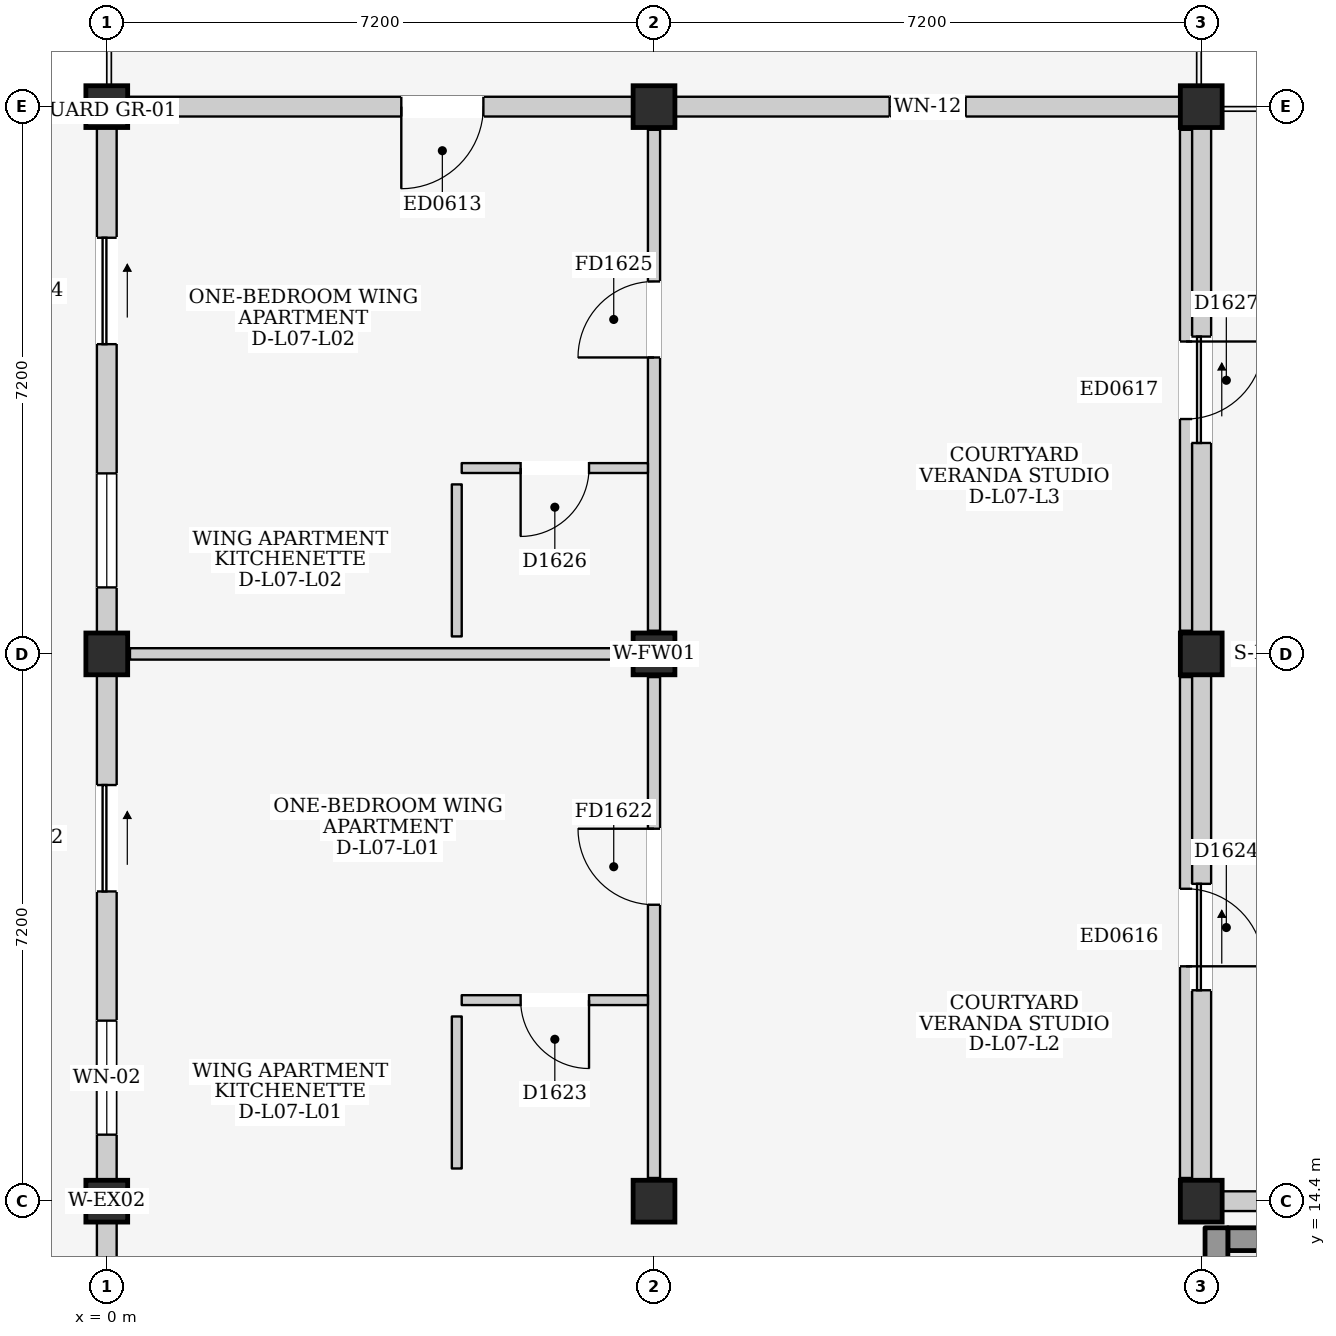
"""IFC4 building model, lengths in metres.
Left out: names, types, materials, properties, quantities, classifications, styles, units other than length and angle.
Written with IfcOpenShell. Run it as: python <this file> out.ifc"""

import sys

from ifc_helpers import new_model, si_unit, direction, frame, frame_2d, origin, origin_2d, place, context, subcontext, project, spatial, rectangle, extrude, element, fill, save


model = new_model("IFC4")
c1 = context("Model", 3, precision=1e-05, world=origin(), true_north=direction((0.0, 1.0)))
c2 = subcontext(c1, "Body", "Model", "MODEL_VIEW")
j1 = project(units=[si_unit("LENGTHUNIT", "METRE"), si_unit("PLANEANGLEUNIT", "RADIAN")], contexts=[c1])
p1 = place(None, origin())
s1 = spatial("IfcSite", under=j1, at=p1, CompositionType="ELEMENT")
p2 = place(p1, origin())
s2 = spatial("IfcBuilding", under=s1, at=p2, CompositionType="ELEMENT")
p3 = place(p2, frame((0.0, 0.0, 25.1)))
s3 = spatial("IfcBuildingStorey", under=s2, at=p3, CompositionType="ELEMENT", Elevation=25.1)
for number, where, z_axis, x_axis in (
    (1, (0.0, 14.4, 0.0), (0.0, 0.0, 1.0), (1.0, 0.0, 0.0)),
    (2, (0.0, 21.6, 0.0), (0.0, 0.0, 1.0), (1.0, 0.0, 0.0)),
    (3, (0.0, 28.8, 0.0), (0.0, 0.0, 1.0), (1.0, 0.0, 0.0)),
    (4, (7.2, 14.4, 0.0), (0.0, 0.0, 1.0), (1.0, 0.0, 0.0)),
    (5, (7.2, 21.6, 0.0), (0.0, 0.0, 1.0), (1.0, 0.0, 0.0)),
    (6, (7.2, 28.8, 0.0), (0.0, 0.0, 1.0), (1.0, 0.0, 0.0)),
    (7, (14.4, 14.4, 0.0), (0.0, 0.0, 1.0), (1.0, 0.0, 0.0)),
    (8, (14.4, 21.6, 0.0), (0.0, 0.0, 1.0), (1.0, 0.0, 0.0)),
    (9, (14.4, 28.8, 0.0), (0.0, 0.0, 1.0), (1.0, 0.0, 0.0)),
):
    element("IfcColumn", number, at=place(p3, frame(where, z_axis=z_axis, x_axis=x_axis)), inside=s3, PredefinedType="COLUMN", context=c2, shape_type="SweptSolid", body=[
        extrude(rectangle(XDim=0.55, YDim=0.55, at=origin_2d()), origin(), (0.0, 0.0, 1.0), 3.2),
    ])
p4 = place(p3, frame((0.0, 7.475, 0.0), z_axis=(0.0, 0.0, 1.0), x_axis=(0.0, 1.0, 0.0)))
e10 = element("IfcWall", 10, at=p4, inside=s3, PredefinedType="ELEMENTEDWALL", context=c2, shape_type="SweptSolid", body=[
    extrude(rectangle(XDim=6.65, YDim=0.26, at=frame_2d((3.325, 0.0))), origin(), (0.0, 0.0, 1.0), 2.525),
])
p5 = place(p4, frame((3.65, 0.0, 0.0)))
e11 = element("IfcOpeningElement", 11, at=p5, cuts=e10, PredefinedType="OPENING", context=c2, shape_type="SweptSolid", body=[
    extrude(rectangle(XDim=1.4, YDim=2.1, at=frame_2d((0.7, 1.05))), frame((0.0, 0.145, 0.0), z_axis=(0.0, -1.0, 0.0), x_axis=(1.0, 0.0, 0.0)), (0.0, 0.0, 1.0), 0.29),
])
p6 = place(p3, frame((0.0, 14.675, 0.0), z_axis=(0.0, 0.0, 1.0), x_axis=(0.0, 1.0, 0.0)))
e12 = element("IfcWall", 12, at=p6, inside=s3, PredefinedType="ELEMENTEDWALL", context=c2, shape_type="SweptSolid", body=[
    extrude(rectangle(XDim=6.65, YDim=0.26, at=frame_2d((3.325, 0.0))), origin(), (0.0, 0.0, 1.0), 2.525),
])
p7 = place(p6, frame((3.8, 0.0, 0.0)))
e13 = element("IfcOpeningElement", 13, at=p7, cuts=e12, PredefinedType="OPENING", context=c2, shape_type="SweptSolid", body=[
    extrude(rectangle(XDim=1.4, YDim=2.1, at=frame_2d((0.7, 1.05))), frame((0.0, 0.145, 0.0), z_axis=(0.0, -1.0, 0.0), x_axis=(1.0, 0.0, 0.0)), (0.0, 0.0, 1.0), 0.29),
])
p8 = place(p6, frame((0.6, 0.0, 0.915)))
e14 = element("IfcOpeningElement", 14, at=p8, cuts=e12, PredefinedType="OPENING", context=c2, shape_type="SweptSolid", body=[
    extrude(rectangle(XDim=1.5, YDim=1.5, at=frame_2d((0.75, 0.75))), frame((0.0, 0.145, 0.0), z_axis=(0.0, -1.0, 0.0), x_axis=(1.0, 0.0, 0.0)), (0.0, 0.0, 1.0), 0.29),
])
p9 = place(p3, frame((0.275, 28.8, 0.0), z_axis=(0.0, 0.0, 1.0), x_axis=(1.0, 0.0, 0.0)))
e15 = element("IfcWall", 15, at=p9, inside=s3, PredefinedType="ELEMENTEDWALL", context=c2, shape_type="SweptSolid", body=[
    extrude(rectangle(XDim=6.65, YDim=0.26, at=frame_2d((3.325, 0.0))), origin(), (0.0, 0.0, 1.0), 2.375),
])
p10 = place(p9, frame((3.6, 0.0, 0.0)))
e16 = element("IfcOpeningElement", 16, at=p10, cuts=e15, PredefinedType="OPENING", context=c2, shape_type="SweptSolid", body=[
    extrude(rectangle(XDim=1.08, YDim=2.12, at=frame_2d((0.54, 1.06))), frame((0.0, 0.145, 0.0), z_axis=(0.0, -1.0, 0.0), x_axis=(1.0, 0.0, 0.0)), (0.0, 0.0, 1.0), 0.29),
])
p11 = place(p3, frame((0.0, 21.875, 0.0), z_axis=(0.0, 0.0, 1.0), x_axis=(0.0, 1.0, 0.0)))
e17 = element("IfcWall", 17, at=p11, inside=s3, PredefinedType="ELEMENTEDWALL", context=c2, shape_type="SweptSolid", body=[
    extrude(rectangle(XDim=6.65, YDim=0.26, at=frame_2d((3.325, 0.0))), origin(), (0.0, 0.0, 1.0), 2.525),
])
p12 = place(p11, frame((3.8, 0.0, 0.0)))
e18 = element("IfcOpeningElement", 18, at=p12, cuts=e17, PredefinedType="OPENING", context=c2, shape_type="SweptSolid", body=[
    extrude(rectangle(XDim=1.4, YDim=2.1, at=frame_2d((0.7, 1.05))), frame((0.0, 0.145, 0.0), z_axis=(0.0, -1.0, 0.0), x_axis=(1.0, 0.0, 0.0)), (0.0, 0.0, 1.0), 0.29),
])
p13 = place(p11, frame((0.6, 0.0, 0.915)))
e19 = element("IfcOpeningElement", 19, at=p13, cuts=e17, PredefinedType="OPENING", context=c2, shape_type="SweptSolid", body=[
    extrude(rectangle(XDim=1.5, YDim=1.5, at=frame_2d((0.75, 0.75))), frame((0.0, 0.145, 0.0), z_axis=(0.0, -1.0, 0.0), x_axis=(1.0, 0.0, 0.0)), (0.0, 0.0, 1.0), 0.29),
])
p14 = place(p3, frame((14.4, 14.675, 0.0), z_axis=(0.0, 0.0, 1.0), x_axis=(0.0, 1.0, 0.0)))
e20 = element("IfcWall", 20, at=p14, inside=s3, PredefinedType="ELEMENTEDWALL", context=c2, shape_type="SweptSolid", body=[
    extrude(rectangle(XDim=6.65, YDim=0.26, at=frame_2d((3.325, 0.0))), origin(), (0.0, 0.0, 1.0), 2.475),
])
p15 = place(p14, frame((2.5, 0.0, 0.0)))
e21 = element("IfcOpeningElement", 21, at=p15, cuts=e20, PredefinedType="OPENING", context=c2, shape_type="SweptSolid", body=[
    extrude(rectangle(XDim=1.4, YDim=2.1, at=frame_2d((0.7, 1.05))), frame((0.0, 0.145, 0.0), z_axis=(0.0, -1.0, 0.0), x_axis=(1.0, 0.0, 0.0)), (0.0, 0.0, 1.0), 0.29),
])
p16 = place(p3, frame((7.475, 28.8, 0.0), z_axis=(0.0, 0.0, 1.0), x_axis=(1.0, 0.0, 0.0)))
e22 = element("IfcWall", 22, at=p16, inside=s3, PredefinedType="ELEMENTEDWALL", context=c2, shape_type="SweptSolid", body=[
    extrude(rectangle(XDim=6.65, YDim=0.26, at=frame_2d((3.325, 0.0))), origin(), (0.0, 0.0, 1.0), 2.375),
])
p17 = place(p16, frame((2.825, 0.0, 1.1)))
e23 = element("IfcOpeningElement", 23, at=p17, cuts=e22, PredefinedType="OPENING", context=c2, shape_type="SweptSolid", body=[
    extrude(rectangle(XDim=1.0, YDim=0.9, at=frame_2d((0.5, 0.45))), frame((0.0, 0.145, 0.0), z_axis=(0.0, -1.0, 0.0), x_axis=(1.0, 0.0, 0.0)), (0.0, 0.0, 1.0), 0.29),
])
p18 = place(p3, frame((14.4, 21.875, 0.0), z_axis=(0.0, 0.0, 1.0), x_axis=(0.0, 1.0, 0.0)))
e24 = element("IfcWall", 24, at=p18, inside=s3, PredefinedType="ELEMENTEDWALL", context=c2, shape_type="SweptSolid", body=[
    extrude(rectangle(XDim=6.65, YDim=0.26, at=frame_2d((3.325, 0.0))), origin(), (0.0, 0.0, 1.0), 2.475),
])
p19 = place(p18, frame((2.5, 0.0, 0.0)))
e25 = element("IfcOpeningElement", 25, at=p19, cuts=e24, PredefinedType="OPENING", context=c2, shape_type="SweptSolid", body=[
    extrude(rectangle(XDim=1.4, YDim=2.1, at=frame_2d((0.7, 1.05))), frame((0.0, 0.145, 0.0), z_axis=(0.0, -1.0, 0.0), x_axis=(1.0, 0.0, 0.0)), (0.0, 0.0, 1.0), 0.29),
])
p20 = place(p3, frame((14.675, 14.4, 0.0), z_axis=(0.0, 0.0, 1.0), x_axis=(1.0, 0.0, 0.0)))
e26 = element("IfcWall", 26, at=p20, inside=s3, PredefinedType="ELEMENTEDWALL", context=c2, shape_type="SweptSolid", body=[
    extrude(rectangle(XDim=6.65, YDim=0.26, at=frame_2d((3.325, 0.0))), origin(), (0.0, 0.0, 1.0), 2.375),
])
p21 = place(p20, frame((2.825, 0.0, 1.2)))
e27 = element("IfcOpeningElement", 27, at=p21, cuts=e26, PredefinedType="OPENING", context=c2, shape_type="SweptSolid", body=[
    extrude(rectangle(XDim=1.0, YDim=0.9, at=frame_2d((0.5, 0.45))), frame((0.0, 0.145, 0.0), z_axis=(0.0, -1.0, 0.0), x_axis=(1.0, 0.0, 0.0)), (0.0, 0.0, 1.0), 0.29),
])
p22 = place(p3, frame((14.75, 13.9, 0.0), z_axis=(0.0, 0.0, 1.0), x_axis=(1.0, 0.0, 0.0)))
e28 = element("IfcWall", 28, at=p22, inside=s3, PredefinedType="SHEAR", context=c2, shape_type="SweptSolid", body=[
    extrude(rectangle(XDim=6.5, YDim=0.3, at=frame_2d((3.25, 0.0))), origin(), (0.0, 0.0, 1.0), 2.99),
])
p23 = place(p3, frame((14.6, 10.45, 0.0), z_axis=(0.0, 0.0, 1.0), x_axis=(0.0, 1.0, 0.0)))
e29 = element("IfcWall", 29, at=p23, inside=s3, PredefinedType="SHEAR", context=c2, shape_type="SweptSolid", body=[
    extrude(rectangle(XDim=3.6, YDim=0.3, at=frame_2d((1.8, 0.0))), origin(), (0.0, 0.0, 1.0), 2.99),
])
p24 = place(p3, frame((7.2, 14.705, 0.0), z_axis=(0.0, 0.0, 1.0), x_axis=(0.0, 1.0, 0.0)))
e30 = element("IfcWall", 30, at=p24, inside=s3, PredefinedType="PARTITIONING", context=c2, shape_type="SweptSolid", body=[
    extrude(rectangle(XDim=6.59, YDim=0.16, at=frame_2d((3.295, 0.0))), origin(), (0.0, 0.0, 1.0), 2.475),
])
p25 = place(p24, frame((3.595, 0.0, 0.0)))
e31 = element("IfcOpeningElement", 31, at=p25, cuts=e30, PredefinedType="OPENING", context=c2, shape_type="SweptSolid", body=[
    extrude(rectangle(XDim=1.0, YDim=2.15, at=frame_2d((0.5, 1.075))), frame((0.0, 0.095, 0.0), z_axis=(0.0, -1.0, 0.0), x_axis=(1.0, 0.0, 0.0)), (0.0, 0.0, 1.0), 0.19),
])
p26 = place(p3, frame((0.305, 21.6, 0.0), z_axis=(0.0, 0.0, 1.0), x_axis=(1.0, 0.0, 0.0)))
e32 = element("IfcWall", 32, at=p26, inside=s3, PredefinedType="PARTITIONING", context=c2, shape_type="SweptSolid", body=[
    extrude(rectangle(XDim=6.59, YDim=0.15, at=frame_2d((3.295, 0.0))), origin(), (0.0, 0.0, 1.0), 2.375),
])
p27 = place(p3, frame((4.67, 17.045, 0.0), z_axis=(0.0, 0.0, 1.0), x_axis=(1.0, 0.0, 0.0)))
e33 = element("IfcWall", 33, at=p27, inside=s3, PredefinedType="PARTITIONING", context=c2, shape_type="SweptSolid", body=[
    extrude(rectangle(XDim=2.45, YDim=0.13, at=frame_2d((1.225, 0.0))), origin(), (0.0, 0.0, 1.0), 2.99),
])
p28 = place(p27, frame((0.775, 0.0, 0.0)))
e34 = element("IfcOpeningElement", 34, at=p28, cuts=e33, PredefinedType="OPENING", context=c2, shape_type="SweptSolid", body=[
    extrude(rectangle(XDim=0.9, YDim=2.1, at=frame_2d((0.45, 1.05))), frame((0.0, 0.08, 0.0), z_axis=(0.0, -1.0, 0.0), x_axis=(1.0, 0.0, 0.0)), (0.0, 0.0, 1.0), 0.16),
])
p29 = place(p3, frame((4.605, 14.83, 0.0), z_axis=(0.0, 0.0, 1.0), x_axis=(0.0, 1.0, 0.0)))
e35 = element("IfcWall", 35, at=p29, inside=s3, PredefinedType="PARTITIONING", context=c2, shape_type="SweptSolid", body=[
    extrude(rectangle(XDim=2.0, YDim=0.13, at=frame_2d((1.0, 0.0))), origin(), (0.0, 0.0, 1.0), 2.99),
])
p30 = place(p3, frame((14.2, 14.705, 0.0), z_axis=(0.0, 0.0, 1.0), x_axis=(0.0, 1.0, 0.0)))
e36 = element("IfcWall", 36, at=p30, inside=s3, PredefinedType="PARTITIONING", context=c2, shape_type="SweptSolid", body=[
    extrude(rectangle(XDim=6.59, YDim=0.16, at=frame_2d((3.295, 0.0))), origin(), (0.0, 0.0, 1.0), 2.99),
])
p31 = place(p30, frame((2.785, 0.0, 0.0)))
e37 = element("IfcOpeningElement", 37, at=p31, cuts=e36, PredefinedType="OPENING", context=c2, shape_type="SweptSolid", body=[
    extrude(rectangle(XDim=1.02, YDim=2.18, at=frame_2d((0.51, 1.09))), frame((0.0, 0.095, 0.0), z_axis=(0.0, -1.0, 0.0), x_axis=(1.0, 0.0, 0.0)), (0.0, 0.0, 1.0), 0.19),
])
p32 = place(p3, frame((7.2, 21.905, 0.0), z_axis=(0.0, 0.0, 1.0), x_axis=(0.0, 1.0, 0.0)))
e38 = element("IfcWall", 38, at=p32, inside=s3, PredefinedType="PARTITIONING", context=c2, shape_type="SweptSolid", body=[
    extrude(rectangle(XDim=6.59, YDim=0.16, at=frame_2d((3.295, 0.0))), origin(), (0.0, 0.0, 1.0), 2.475),
])
p33 = place(p32, frame((3.595, 0.0, 0.0)))
e39 = element("IfcOpeningElement", 39, at=p33, cuts=e38, PredefinedType="OPENING", context=c2, shape_type="SweptSolid", body=[
    extrude(rectangle(XDim=1.0, YDim=2.15, at=frame_2d((0.5, 1.075))), frame((0.0, 0.095, 0.0), z_axis=(0.0, -1.0, 0.0), x_axis=(1.0, 0.0, 0.0)), (0.0, 0.0, 1.0), 0.19),
])
p34 = place(p3, frame((4.67, 24.045, 0.0), z_axis=(0.0, 0.0, 1.0), x_axis=(1.0, 0.0, 0.0)))
e40 = element("IfcWall", 40, at=p34, inside=s3, PredefinedType="PARTITIONING", context=c2, shape_type="SweptSolid", body=[
    extrude(rectangle(XDim=2.45, YDim=0.13, at=frame_2d((1.225, 0.0))), origin(), (0.0, 0.0, 1.0), 2.99),
])
p35 = place(p34, frame((0.775, 0.0, 0.0)))
e41 = element("IfcOpeningElement", 41, at=p35, cuts=e40, PredefinedType="OPENING", context=c2, shape_type="SweptSolid", body=[
    extrude(rectangle(XDim=0.9, YDim=2.1, at=frame_2d((0.45, 1.05))), frame((0.0, 0.08, 0.0), z_axis=(0.0, -1.0, 0.0), x_axis=(1.0, 0.0, 0.0)), (0.0, 0.0, 1.0), 0.16),
])
p36 = place(p3, frame((4.605, 21.83, 0.0), z_axis=(0.0, 0.0, 1.0), x_axis=(0.0, 1.0, 0.0)))
e42 = element("IfcWall", 42, at=p36, inside=s3, PredefinedType="PARTITIONING", context=c2, shape_type="SweptSolid", body=[
    extrude(rectangle(XDim=2.0, YDim=0.13, at=frame_2d((1.0, 0.0))), origin(), (0.0, 0.0, 1.0), 2.99),
])
p37 = place(p3, frame((14.2, 21.905, 0.0), z_axis=(0.0, 0.0, 1.0), x_axis=(0.0, 1.0, 0.0)))
e43 = element("IfcWall", 43, at=p37, inside=s3, PredefinedType="PARTITIONING", context=c2, shape_type="SweptSolid", body=[
    extrude(rectangle(XDim=6.59, YDim=0.16, at=frame_2d((3.295, 0.0))), origin(), (0.0, 0.0, 1.0), 2.99),
])
p38 = place(p37, frame((2.785, 0.0, 0.0)))
e44 = element("IfcOpeningElement", 44, at=p38, cuts=e43, PredefinedType="OPENING", context=c2, shape_type="SweptSolid", body=[
    extrude(rectangle(XDim=1.02, YDim=2.18, at=frame_2d((0.51, 1.09))), frame((0.0, 0.095, 0.0), z_axis=(0.0, -1.0, 0.0), x_axis=(1.0, 0.0, 0.0)), (0.0, 0.0, 1.0), 0.19),
])
p39 = place(p7, frame((1.4, 0.0, 0.0), z_axis=(0.0, 0.0, 1.0), x_axis=(-1.0, 0.0, 0.0)))
e45 = element("IfcDoor", 45, at=p39, inside=s3, OperationType="SLIDING_TO_RIGHT", PredefinedType="DOOR", context=c2, shape_type="SweptSolid", body=[
    extrude(rectangle(XDim=1.4, YDim=2.1, at=frame_2d((0.7, 1.05))), frame((0.0, 0.025, 0.0), z_axis=(0.0, -1.0, 0.0), x_axis=(1.0, 0.0, 0.0)), (0.0, 0.0, 1.0), 0.05),
])
fill(e13, e45)
p40 = place(p8, origin())
e46 = element("IfcWindow", 46, at=p40, inside=s3, PartitioningType="DOUBLE_PANEL_VERTICAL", PredefinedType="WINDOW", context=c2, shape_type="SweptSolid", body=[
    extrude(rectangle(XDim=1.5, YDim=1.5, at=frame_2d((0.75, 0.75))), frame((0.0, 0.03, 0.0), z_axis=(0.0, -1.0, 0.0), x_axis=(1.0, 0.0, 0.0)), (0.0, 0.0, 1.0), 0.06),
])
fill(e14, e46)
p41 = place(p10, frame((1.08, 0.0, 0.0), z_axis=(0.0, 0.0, 1.0), x_axis=(-1.0, 0.0, 0.0)))
e47 = element("IfcDoor", 47, at=p41, inside=s3, OperationType="SINGLE_SWING_RIGHT", PredefinedType="DOOR", context=c2, shape_type="SweptSolid", body=[
    extrude(rectangle(XDim=1.08, YDim=2.12, at=frame_2d((0.54, 1.06))), frame((0.0, 0.025, 0.0), z_axis=(0.0, -1.0, 0.0), x_axis=(1.0, 0.0, 0.0)), (0.0, 0.0, 1.0), 0.05),
])
fill(e16, e47)
p42 = place(p12, frame((1.4, 0.0, 0.0), z_axis=(0.0, 0.0, 1.0), x_axis=(-1.0, 0.0, 0.0)))
e48 = element("IfcDoor", 48, at=p42, inside=s3, OperationType="SLIDING_TO_RIGHT", PredefinedType="DOOR", context=c2, shape_type="SweptSolid", body=[
    extrude(rectangle(XDim=1.4, YDim=2.1, at=frame_2d((0.7, 1.05))), frame((0.0, 0.025, 0.0), z_axis=(0.0, -1.0, 0.0), x_axis=(1.0, 0.0, 0.0)), (0.0, 0.0, 1.0), 0.05),
])
fill(e18, e48)
p43 = place(p13, origin())
e49 = element("IfcWindow", 49, at=p43, inside=s3, PartitioningType="DOUBLE_PANEL_VERTICAL", PredefinedType="WINDOW", context=c2, shape_type="SweptSolid", body=[
    extrude(rectangle(XDim=1.5, YDim=1.5, at=frame_2d((0.75, 0.75))), frame((0.0, 0.03, 0.0), z_axis=(0.0, -1.0, 0.0), x_axis=(1.0, 0.0, 0.0)), (0.0, 0.0, 1.0), 0.06),
])
fill(e19, e49)
p44 = place(p15, frame((1.4, 0.0, 0.0), z_axis=(0.0, 0.0, 1.0), x_axis=(-1.0, 0.0, 0.0)))
e50 = element("IfcDoor", 50, at=p44, inside=s3, OperationType="SLIDING_TO_RIGHT", PredefinedType="DOOR", context=c2, shape_type="SweptSolid", body=[
    extrude(rectangle(XDim=1.4, YDim=2.1, at=frame_2d((0.7, 1.05))), frame((0.0, 0.025, 0.0), z_axis=(0.0, -1.0, 0.0), x_axis=(1.0, 0.0, 0.0)), (0.0, 0.0, 1.0), 0.05),
])
fill(e21, e50)
p45 = place(p17, origin())
e51 = element("IfcWindow", 51, at=p45, inside=s3, PartitioningType="SINGLE_PANEL", PredefinedType="WINDOW", context=c2, shape_type="SweptSolid", body=[
    extrude(rectangle(XDim=1.0, YDim=0.9, at=frame_2d((0.5, 0.45))), frame((0.0, 0.03, 0.0), z_axis=(0.0, -1.0, 0.0), x_axis=(1.0, 0.0, 0.0)), (0.0, 0.0, 1.0), 0.06),
])
fill(e23, e51)
p46 = place(p19, frame((1.4, 0.0, 0.0), z_axis=(0.0, 0.0, 1.0), x_axis=(-1.0, 0.0, 0.0)))
e52 = element("IfcDoor", 52, at=p46, inside=s3, OperationType="SLIDING_TO_RIGHT", PredefinedType="DOOR", context=c2, shape_type="SweptSolid", body=[
    extrude(rectangle(XDim=1.4, YDim=2.1, at=frame_2d((0.7, 1.05))), frame((0.0, 0.025, 0.0), z_axis=(0.0, -1.0, 0.0), x_axis=(1.0, 0.0, 0.0)), (0.0, 0.0, 1.0), 0.05),
])
fill(e25, e52)
p47 = place(p25, origin())
e53 = element("IfcDoor", 53, at=p47, inside=s3, OperationType="SINGLE_SWING_RIGHT", PredefinedType="DOOR", context=c2, shape_type="SweptSolid", body=[
    extrude(rectangle(XDim=1.0, YDim=2.15, at=frame_2d((0.5, 1.075))), frame((0.0, 0.025, 0.0), z_axis=(0.0, -1.0, 0.0), x_axis=(1.0, 0.0, 0.0)), (0.0, 0.0, 1.0), 0.05),
])
fill(e31, e53)
p48 = place(p28, frame((0.9, 0.0, 0.0), z_axis=(0.0, 0.0, 1.0), x_axis=(-1.0, 0.0, 0.0)))
e54 = element("IfcDoor", 54, at=p48, inside=s3, OperationType="SINGLE_SWING_LEFT", PredefinedType="DOOR", context=c2, shape_type="SweptSolid", body=[
    extrude(rectangle(XDim=0.9, YDim=2.1, at=frame_2d((0.45, 1.05))), frame((0.0, 0.025, 0.0), z_axis=(0.0, -1.0, 0.0), x_axis=(1.0, 0.0, 0.0)), (0.0, 0.0, 1.0), 0.05),
])
fill(e34, e54)
p49 = place(p31, frame((1.02, 0.0, 0.0), z_axis=(0.0, 0.0, 1.0), x_axis=(-1.0, 0.0, 0.0)))
e55 = element("IfcDoor", 55, at=p49, inside=s3, OperationType="SINGLE_SWING_RIGHT", PredefinedType="DOOR", context=c2, shape_type="SweptSolid", body=[
    extrude(rectangle(XDim=1.02, YDim=2.18, at=frame_2d((0.51, 1.09))), frame((0.0, 0.025, 0.0), z_axis=(0.0, -1.0, 0.0), x_axis=(1.0, 0.0, 0.0)), (0.0, 0.0, 1.0), 0.05),
])
fill(e37, e55)
p50 = place(p33, origin())
e56 = element("IfcDoor", 56, at=p50, inside=s3, OperationType="SINGLE_SWING_LEFT", PredefinedType="DOOR", context=c2, shape_type="SweptSolid", body=[
    extrude(rectangle(XDim=1.0, YDim=2.15, at=frame_2d((0.5, 1.075))), frame((0.0, 0.025, 0.0), z_axis=(0.0, -1.0, 0.0), x_axis=(1.0, 0.0, 0.0)), (0.0, 0.0, 1.0), 0.05),
])
fill(e39, e56)
p51 = place(p35, frame((0.9, 0.0, 0.0), z_axis=(0.0, 0.0, 1.0), x_axis=(-1.0, 0.0, 0.0)))
e57 = element("IfcDoor", 57, at=p51, inside=s3, OperationType="SINGLE_SWING_RIGHT", PredefinedType="DOOR", context=c2, shape_type="SweptSolid", body=[
    extrude(rectangle(XDim=0.9, YDim=2.1, at=frame_2d((0.45, 1.05))), frame((0.0, 0.025, 0.0), z_axis=(0.0, -1.0, 0.0), x_axis=(1.0, 0.0, 0.0)), (0.0, 0.0, 1.0), 0.05),
])
fill(e41, e57)
p52 = place(p38, frame((1.02, 0.0, 0.0), z_axis=(0.0, 0.0, 1.0), x_axis=(-1.0, 0.0, 0.0)))
e58 = element("IfcDoor", 58, at=p52, inside=s3, OperationType="SINGLE_SWING_LEFT", PredefinedType="DOOR", context=c2, shape_type="SweptSolid", body=[
    extrude(rectangle(XDim=1.02, YDim=2.18, at=frame_2d((0.51, 1.09))), frame((0.0, 0.025, 0.0), z_axis=(0.0, -1.0, 0.0), x_axis=(1.0, 0.0, 0.0)), (0.0, 0.0, 1.0), 0.05),
])
fill(e44, e58)
save(model, sys.argv[1])
